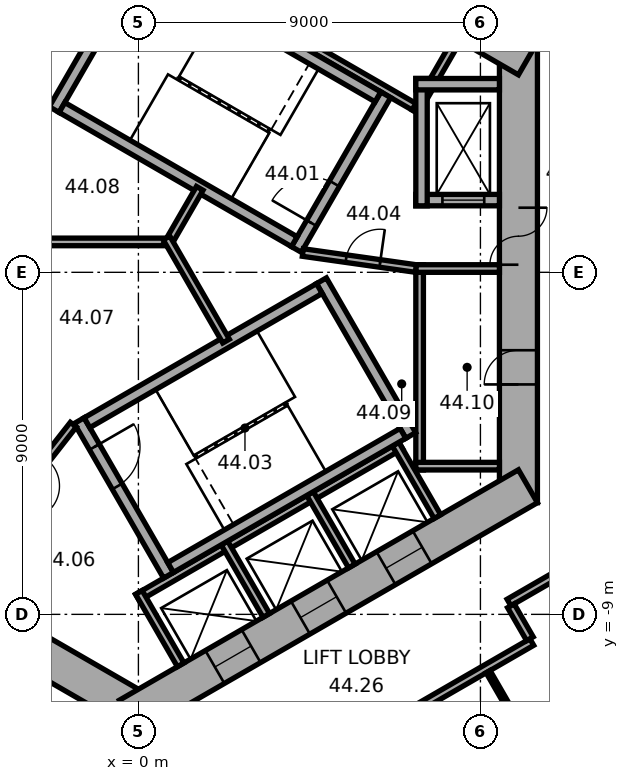
"""IFC4 building model, lengths in metres.
Left out: names, types, materials, properties, quantities, classifications, styles, units other than length and angle.
Written with IfcOpenShell. Run it as: python <this file> out.ifc"""

import sys

from ifc_helpers import new_model, si_unit, direction, frame, frame_2d, origin, place, context, subcontext, project, spatial, rectangle, extrude, element, fill, save


model = new_model("IFC4")
c1 = context("Model", 3, precision=1e-05, world=origin(), true_north=direction((0.0, 1.0)))
c2 = subcontext(c1, "Body", "Model", "MODEL_VIEW")
j1 = project(units=[si_unit("LENGTHUNIT", "METRE"), si_unit("PLANEANGLEUNIT", "RADIAN")], contexts=[c1])
p1 = place(None, origin())
s1 = spatial("IfcSite", under=j1, at=p1, CompositionType="ELEMENT")
p2 = place(p1, origin())
s2 = spatial("IfcBuilding", under=s1, at=p2, CompositionType="ELEMENT")
p3 = place(p2, frame((0.0, 0.0, 179.9)))
s3 = spatial("IfcBuildingStorey", under=s2, at=p3, CompositionType="ELEMENT", Elevation=179.9)
p4 = place(p3, frame((10.0, -6.062, 0.0), z_axis=(0.0, 0.0, 1.0), x_axis=(0.0, 1.0, 0.0)))
e1 = element("IfcWall", 1, at=p4, inside=s3, PredefinedType="SHEAR", context=c2, shape_type="SweptSolid", body=[
    extrude(rectangle(XDim=12.125, YDim=1.0, at=frame_2d((6.062, 0.0))), origin(), (0.0, 0.0, 1.0), 3.7),
])
p5 = place(p4, frame((6.262, 0.0, 0.0)))
e2 = element("IfcOpeningElement", 2, at=p5, cuts=e1, PredefinedType="OPENING", context=c2, shape_type="SweptSolid", body=[
    extrude(rectangle(XDim=1.5, YDim=2.1, at=frame_2d((0.75, 1.05))), frame((0.0, 0.51, 0.0), z_axis=(0.0, -1.0, 0.0), x_axis=(1.0, 0.0, 0.0)), (0.0, 0.0, 1.0), 1.02),
])
p6 = place(p4, frame((3.112, 0.0, 0.0)))
e3 = element("IfcOpeningElement", 3, at=p6, cuts=e1, PredefinedType="OPENING", context=c2, shape_type="SweptSolid", body=[
    extrude(rectangle(XDim=0.9, YDim=2.1, at=frame_2d((0.45, 1.05))), frame((0.0, 0.51, 0.0), z_axis=(0.0, -1.0, 0.0), x_axis=(1.0, 0.0, 0.0)), (0.0, 0.0, 1.0), 1.02),
])
p7 = place(p3, frame((10.25, 5.629, 0.0), z_axis=(0.0, 0.0, 1.0), x_axis=(-0.866022616891, 0.50000482701, 0.0)))
e4 = element("IfcWall", 4, at=p7, inside=s3, PredefinedType="SHEAR", context=c2, shape_type="SweptSolid", body=[
    extrude(rectangle(XDim=12.125, YDim=1.0, at=frame_2d((6.062, 0.0))), origin(), (0.0, 0.0, 1.0), 3.7),
])
p8 = place(p7, frame((5.312, 0.0, 0.0)))
e5 = element("IfcOpeningElement", 5, at=p8, cuts=e4, PredefinedType="OPENING", context=c2, shape_type="SweptSolid", body=[
    extrude(rectangle(XDim=0.9, YDim=2.1, at=frame_2d((0.45, 1.05))), frame((0.0, 0.51, 0.0), z_axis=(0.0, -1.0, 0.0), x_axis=(1.0, 0.0, 0.0)), (0.0, 0.0, 1.0), 1.02),
])
p9 = place(p3, frame((0.25, 11.691, 0.0), z_axis=(0.0, 0.0, 1.0), x_axis=(-0.866022616891, -0.50000482701, 0.0)))
e6 = element("IfcWall", 6, at=p9, inside=s3, PredefinedType="SHEAR", context=c2, shape_type="SweptSolid", body=[
    extrude(rectangle(XDim=12.125, YDim=1.0, at=frame_2d((6.062, 0.0))), origin(), (0.0, 0.0, 1.0), 3.7),
])
p10 = place(p9, frame((6.262, 0.0, 0.0)))
e7 = element("IfcOpeningElement", 7, at=p10, cuts=e6, PredefinedType="OPENING", context=c2, shape_type="SweptSolid", body=[
    extrude(rectangle(XDim=1.5, YDim=2.1, at=frame_2d((0.75, 1.05))), frame((0.0, 0.51, 0.0), z_axis=(0.0, -1.0, 0.0), x_axis=(1.0, 0.0, 0.0)), (0.0, 0.0, 1.0), 1.02),
])
p11 = place(p9, frame((1.812, 0.0, 0.0)))
e8 = element("IfcOpeningElement", 8, at=p11, cuts=e6, PredefinedType="OPENING", context=c2, shape_type="SweptSolid", body=[
    extrude(rectangle(XDim=0.9, YDim=2.1, at=frame_2d((0.45, 1.05))), frame((0.0, 0.51, 0.0), z_axis=(0.0, -1.0, 0.0), x_axis=(1.0, 0.0, 0.0)), (0.0, 0.0, 1.0), 1.02),
])
p12 = place(p9, frame((4.412, 0.0, 0.0)))
e9 = element("IfcOpeningElement", 9, at=p12, cuts=e6, PredefinedType="OPENING", context=c2, shape_type="SweptSolid", body=[
    extrude(rectangle(XDim=0.9, YDim=2.1, at=frame_2d((0.45, 1.05))), frame((0.0, 0.51, 0.0), z_axis=(0.0, -1.0, 0.0), x_axis=(1.0, 0.0, 0.0)), (0.0, 0.0, 1.0), 1.02),
])
p13 = place(p3, frame((-10.25, -5.629, 0.0), z_axis=(0.0, 0.0, 1.0), x_axis=(0.866022616891, -0.50000482701, 0.0)))
e10 = element("IfcWall", 10, at=p13, inside=s3, PredefinedType="SHEAR", context=c2, shape_type="SweptSolid", body=[
    extrude(rectangle(XDim=12.125, YDim=1.0, at=frame_2d((6.062, 0.0))), origin(), (0.0, 0.0, 1.0), 3.7),
])
p14 = place(p13, frame((6.262, 0.0, 0.0)))
e11 = element("IfcOpeningElement", 11, at=p14, cuts=e10, PredefinedType="OPENING", context=c2, shape_type="SweptSolid", body=[
    extrude(rectangle(XDim=1.5, YDim=2.1, at=frame_2d((0.75, 1.05))), frame((0.0, 0.51, 0.0), z_axis=(0.0, -1.0, 0.0), x_axis=(1.0, 0.0, 0.0)), (0.0, 0.0, 1.0), 1.02),
])
p15 = place(p13, frame((1.712, 0.0, 0.0)))
e12 = element("IfcOpeningElement", 12, at=p15, cuts=e10, PredefinedType="OPENING", context=c2, shape_type="SweptSolid", body=[
    extrude(rectangle(XDim=1.1, YDim=2.1, at=frame_2d((0.55, 1.05))), frame((0.0, 0.51, 0.0), z_axis=(0.0, -1.0, 0.0), x_axis=(1.0, 0.0, 0.0)), (0.0, 0.0, 1.0), 1.02),
])
p16 = place(p13, frame((4.312, 0.0, 0.0)))
e13 = element("IfcOpeningElement", 13, at=p16, cuts=e10, PredefinedType="OPENING", context=c2, shape_type="SweptSolid", body=[
    extrude(rectangle(XDim=1.1, YDim=2.1, at=frame_2d((0.55, 1.05))), frame((0.0, 0.51, 0.0), z_axis=(0.0, -1.0, 0.0), x_axis=(1.0, 0.0, 0.0)), (0.0, 0.0, 1.0), 1.02),
])
p17 = place(p3, frame((-0.25, -11.691, 0.0), z_axis=(0.0, 0.0, 1.0), x_axis=(0.866022616891, 0.50000482701, 0.0)))
e14 = element("IfcWall", 14, at=p17, inside=s3, PredefinedType="SHEAR", context=c2, shape_type="SweptSolid", body=[
    extrude(rectangle(XDim=12.125, YDim=1.0, at=frame_2d((6.062, 0.0))), origin(), (0.0, 0.0, 1.0), 3.7),
])
p18 = place(p17, frame((2.612, 0.0, 0.0)))
e15 = element("IfcOpeningElement", 15, at=p18, cuts=e14, PredefinedType="OPENING", context=c2, shape_type="SweptSolid", body=[
    extrude(rectangle(XDim=1.1, YDim=2.1, at=frame_2d((0.55, 1.05))), frame((0.0, 0.51, 0.0), z_axis=(0.0, -1.0, 0.0), x_axis=(1.0, 0.0, 0.0)), (0.0, 0.0, 1.0), 1.02),
])
p19 = place(p17, frame((5.212, 0.0, 0.0)))
e16 = element("IfcOpeningElement", 16, at=p19, cuts=e14, PredefinedType="OPENING", context=c2, shape_type="SweptSolid", body=[
    extrude(rectangle(XDim=1.1, YDim=2.1, at=frame_2d((0.55, 1.05))), frame((0.0, 0.51, 0.0), z_axis=(0.0, -1.0, 0.0), x_axis=(1.0, 0.0, 0.0)), (0.0, 0.0, 1.0), 1.02),
])
p20 = place(p17, frame((7.812, 0.0, 0.0)))
e17 = element("IfcOpeningElement", 17, at=p20, cuts=e14, PredefinedType="OPENING", context=c2, shape_type="SweptSolid", body=[
    extrude(rectangle(XDim=1.1, YDim=2.1, at=frame_2d((0.55, 1.05))), frame((0.0, 0.51, 0.0), z_axis=(0.0, -1.0, 0.0), x_axis=(1.0, 0.0, 0.0)), (0.0, 0.0, 1.0), 1.02),
])
p21 = place(p3, frame((7.4, -5.2, 0.0), z_axis=(0.0, 0.0, 1.0), x_axis=(0.0, 1.0, 0.0)))
e18 = element("IfcWall", 18, at=p21, inside=s3, PredefinedType="PARTITIONING", context=c2, shape_type="SweptSolid", body=[
    extrude(rectangle(XDim=5.4, YDim=0.2, at=frame_2d((2.7, 0.0))), origin(), (0.0, 0.0, 1.0), 3.42),
])
for number, where, z_axis, x_axis in (
    (19, (7.3, -5.1, 0.0), (0.0, 0.0, 1.0), (1.0, 0.0, 0.0)),
    (20, (7.3, 0.1, 0.0), (0.0, 0.0, 1.0), (1.0, 0.0, 0.0)),
):
    element("IfcWall", number, at=place(p3, frame(where, z_axis=z_axis, x_axis=x_axis)), inside=s3, PredefinedType="PARTITIONING", context=c2, shape_type="SweptSolid", body=[
        extrude(rectangle(XDim=2.2, YDim=0.2, at=frame_2d((1.1, 0.0))), origin(), (0.0, 0.0, 1.0), 3.42),
    ])
p22 = place(p3, frame((7.424, 4.259, 0.0), z_axis=(0.0, 0.0, 1.0), x_axis=(-0.866026010844, 0.49999894854, 0.0)))
e21 = element("IfcWall", 21, at=p22, inside=s3, PredefinedType="PARTITIONING", context=c2, shape_type="SweptSolid", body=[
    extrude(rectangle(XDim=8.0, YDim=0.2, at=frame_2d((4.0, 0.0))), origin(), (0.0, 0.0, 1.0), 3.42),
])
p23 = place(p3, frame((7.287, 4.222, 0.0), z_axis=(0.0, 0.0, 1.0), x_axis=(0.499946605688, 0.86605622881, 0.0)))
e22 = element("IfcWall", 22, at=p23, inside=s3, PredefinedType="PARTITIONING", context=c2, shape_type="SweptSolid", body=[
    extrude(rectangle(XDim=2.2, YDim=0.2, at=frame_2d((1.1, 0.0))), origin(), (0.0, 0.0, 1.0), 3.42),
])
p24 = place(p3, frame((-0.024, -8.559, 0.0), z_axis=(0.0, 0.0, 1.0), x_axis=(0.866026010844, 0.49999894854, 0.0)))
e23 = element("IfcWall", 23, at=p24, inside=s3, PredefinedType="PARTITIONING", context=c2, shape_type="SweptSolid", body=[
    extrude(rectangle(XDim=8.0, YDim=0.2, at=frame_2d((4.0, 0.0))), origin(), (0.0, 0.0, 1.0), 3.42),
])
for number, where, z_axis, x_axis in (
    (24, (0.013, -8.422, 0.0), (0.0, 0.0, 1.0), (0.5, -0.866, 0.0)),
    (25, (2.264, -7.122, 0.0), (0.0, 0.0, 1.0), (0.5, -0.866, 0.0)),
    (26, (4.516, -5.822, 0.0), (0.0, 0.0, 1.0), (0.5, -0.866, 0.0)),
    (27, (6.768, -4.522, 0.0), (0.0, 0.0, 1.0), (0.5, -0.866, 0.0)),
):
    element("IfcWall", number, at=place(p3, frame(where, z_axis=z_axis, x_axis=x_axis)), inside=s3, PredefinedType="PARTITIONING", context=c2, shape_type="SweptSolid", body=[
        extrude(rectangle(XDim=2.2, YDim=0.2, at=frame_2d((1.1, 0.0))), origin(), (0.0, 0.0, 1.0), 3.42),
    ])
p25 = place(p3, frame((4.158, 0.602, 0.0), z_axis=(0.0, 0.0, 1.0), x_axis=(0.499977259774, 0.866038532462, 0.0)))
e28 = element("IfcWall", 28, at=p25, inside=s3, PredefinedType="SHEAR", context=c2, shape_type="SweptSolid", body=[
    extrude(rectangle(XDim=4.7, YDim=0.3, at=frame_2d((2.35, 0.0))), origin(), (0.0, 0.0, 1.0), 3.42),
])
p26 = place(p25, frame((0.8, 0.0, 0.0)))
e29 = element("IfcOpeningElement", 29, at=p26, cuts=e28, PredefinedType="OPENING", context=c2, shape_type="SweptSolid", body=[
    extrude(rectangle(XDim=1.2, YDim=2.1, at=frame_2d((0.6, 1.05))), frame((0.0, 0.16, 0.0), z_axis=(0.0, -1.0, 0.0), x_axis=(1.0, 0.0, 0.0)), (0.0, 0.0, 1.0), 0.32),
])
p27 = place(p3, frame((-2.216, 4.282, 0.0), z_axis=(0.0, 0.0, 1.0), x_axis=(0.499977259774, 0.866038532462, 0.0)))
e30 = element("IfcWall", 30, at=p27, inside=s3, PredefinedType="SHEAR", context=c2, shape_type="SweptSolid", body=[
    extrude(rectangle(XDim=4.7, YDim=0.3, at=frame_2d((2.35, 0.0))), origin(), (0.0, 0.0, 1.0), 3.42),
])
for number, where, z_axis, x_axis in (
    (31, (4.103, 0.807, 0.0), (0.0, 0.0, 1.0), (-0.866, 0.5, 0.0)),
    (32, (6.303, 4.617, 0.0), (0.0, 0.0, 1.0), (-0.866, 0.5, 0.0)),
):
    element("IfcWall", number, at=place(p3, frame(where, z_axis=z_axis, x_axis=x_axis)), inside=s3, PredefinedType="SHEAR", context=c2, shape_type="SweptSolid", body=[
        extrude(rectangle(XDim=7.06, YDim=0.3, at=frame_2d((3.53, 0.0))), origin(), (0.0, 0.0, 1.0), 3.42),
    ])
p28 = place(p3, frame((-1.558, -3.902, 0.0), z_axis=(0.0, 0.0, 1.0), x_axis=(0.499977259774, -0.866038532462, 0.0)))
e33 = element("IfcWall", 33, at=p28, inside=s3, PredefinedType="SHEAR", context=c2, shape_type="SweptSolid", body=[
    extrude(rectangle(XDim=4.7, YDim=0.3, at=frame_2d((2.35, 0.0))), origin(), (0.0, 0.0, 1.0), 3.42),
])
p29 = place(p28, frame((0.8, 0.0, 0.0)))
e34 = element("IfcOpeningElement", 34, at=p29, cuts=e33, PredefinedType="OPENING", context=c2, shape_type="SweptSolid", body=[
    extrude(rectangle(XDim=1.2, YDim=2.1, at=frame_2d((0.6, 1.05))), frame((0.0, 0.16, 0.0), z_axis=(0.0, -1.0, 0.0), x_axis=(1.0, 0.0, 0.0)), (0.0, 0.0, 1.0), 0.32),
])
p30 = place(p3, frame((4.816, -0.222, 0.0), z_axis=(0.0, 0.0, 1.0), x_axis=(0.499977259774, -0.866038532462, 0.0)))
e35 = element("IfcWall", 35, at=p30, inside=s3, PredefinedType="SHEAR", context=c2, shape_type="SweptSolid", body=[
    extrude(rectangle(XDim=4.7, YDim=0.3, at=frame_2d((2.35, 0.0))), origin(), (0.0, 0.0, 1.0), 3.42),
])
for number, where, z_axis, x_axis in (
    (36, (-1.353, -3.957, 0.0), (0.0, 0.0, 1.0), (0.866, 0.5, 0.0)),
    (37, (0.847, -7.767, 0.0), (0.0, 0.0, 1.0), (0.866, 0.5, 0.0)),
):
    element("IfcWall", number, at=place(p3, frame(where, z_axis=z_axis, x_axis=x_axis)), inside=s3, PredefinedType="SHEAR", context=c2, shape_type="SweptSolid", body=[
        extrude(rectangle(XDim=7.06, YDim=0.3, at=frame_2d((3.53, 0.0))), origin(), (0.0, 0.0, 1.0), 3.42),
    ])
p31 = place(p3, frame((7.3, 1.9, 0.0), z_axis=(0.0, 0.0, 1.0), x_axis=(1.0, 0.0, 0.0)))
e38 = element("IfcWall", 38, at=p31, inside=s3, PredefinedType="SHEAR", context=c2, shape_type="SweptSolid", body=[
    extrude(rectangle(XDim=2.2, YDim=0.3, at=frame_2d((1.1, 0.0))), origin(), (0.0, 0.0, 1.0), 3.42),
])
p32 = place(p31, frame((0.7, 0.0, 0.0)))
e39 = element("IfcOpeningElement", 39, at=p32, cuts=e38, PredefinedType="OPENING", context=c2, shape_type="SweptSolid", body=[
    extrude(rectangle(XDim=1.1, YDim=2.1, at=frame_2d((0.55, 1.05))), frame((0.0, 0.16, 0.0), z_axis=(0.0, -1.0, 0.0), x_axis=(1.0, 0.0, 0.0)), (0.0, 0.0, 1.0), 0.32),
])
p33 = place(p3, frame((7.45, 1.75, 0.0), z_axis=(0.0, 0.0, 1.0), x_axis=(0.0, 1.0, 0.0)))
e40 = element("IfcWall", 40, at=p33, inside=s3, PredefinedType="SHEAR", context=c2, shape_type="SweptSolid", body=[
    extrude(rectangle(XDim=3.35, YDim=0.3, at=frame_2d((1.675, 0.0))), origin(), (0.0, 0.0, 1.0), 3.42),
])
p34 = place(p3, frame((7.3, 4.95, 0.0), z_axis=(0.0, 0.0, 1.0), x_axis=(1.0, 0.0, 0.0)))
e41 = element("IfcWall", 41, at=p34, inside=s3, PredefinedType="SHEAR", context=c2, shape_type="SweptSolid", body=[
    extrude(rectangle(XDim=2.2, YDim=0.3, at=frame_2d((1.1, 0.0))), origin(), (0.0, 0.0, 1.0), 3.42),
])
p35 = place(p3, frame((4.327, 0.521, 0.0), z_axis=(0.0, 0.0, 1.0), x_axis=(0.990124376366, -0.14019172346, 0.0)))
e42 = element("IfcWall", 42, at=p35, inside=s3, PredefinedType="PARTITIONING", context=c2, shape_type="SweptSolid", body=[
    extrude(rectangle(XDim=3.002, YDim=0.2, at=frame_2d((1.501, 0.0))), origin(), (0.0, 0.0, 1.0), 3.42),
])
p36 = place(p35, frame((1.15, 0.0, 0.0)))
e43 = element("IfcOpeningElement", 43, at=p36, cuts=e42, PredefinedType="OPENING", context=c2, shape_type="SweptSolid", body=[
    extrude(rectangle(XDim=0.9, YDim=2.1, at=frame_2d((0.45, 1.05))), frame((0.0, 0.11, 0.0), z_axis=(0.0, -1.0, 0.0), x_axis=(1.0, 0.0, 0.0)), (0.0, 0.0, 1.0), 0.22),
])
p37 = place(p3, frame((-1.712, -4.008, 0.0), z_axis=(0.0, 0.0, 1.0), x_axis=(-0.616549420702, -0.787316208287, 0.0)))
e44 = element("IfcWall", 44, at=p37, inside=s3, PredefinedType="PARTITIONING", context=c2, shape_type="SweptSolid", body=[
    extrude(rectangle(XDim=3.002, YDim=0.2, at=frame_2d((1.501, 0.0))), origin(), (0.0, 0.0, 1.0), 3.42),
])
p38 = place(p37, frame((1.15, 0.0, 0.0)))
e45 = element("IfcOpeningElement", 45, at=p38, cuts=e44, PredefinedType="OPENING", context=c2, shape_type="SweptSolid", body=[
    extrude(rectangle(XDim=0.9, YDim=2.1, at=frame_2d((0.45, 1.05))), frame((0.0, 0.11, 0.0), z_axis=(0.0, -1.0, 0.0), x_axis=(1.0, 0.0, 0.0)), (0.0, 0.0, 1.0), 0.22),
])
p39 = place(p3, frame((0.92, 0.8, 0.0), z_axis=(0.0, 0.0, 1.0), x_axis=(-1.0, 0.0, 0.0)))
e46 = element("IfcWall", 46, at=p39, inside=s3, PredefinedType="PARTITIONING", context=c2, shape_type="SweptSolid", body=[
    extrude(rectangle(XDim=3.64, YDim=0.2, at=frame_2d((1.82, 0.0))), origin(), (0.0, 0.0, 1.0), 3.42),
])
p40 = place(p3, frame((0.74, 0.696, 0.0), z_axis=(0.0, 0.0, 1.0), x_axis=(0.499956301907, 0.86605063142, 0.0)))
e47 = element("IfcWall", 47, at=p40, inside=s3, PredefinedType="PARTITIONING", context=c2, shape_type="SweptSolid", body=[
    extrude(rectangle(XDim=1.747, YDim=0.2, at=frame_2d((0.874, 0.0))), origin(), (0.0, 0.0, 1.0), 3.42),
])
p41 = place(p3, frame((0.74, 0.904, 0.0), z_axis=(0.0, 0.0, 1.0), x_axis=(0.500028278809, -0.866009076391, 0.0)))
e48 = element("IfcWall", 48, at=p41, inside=s3, PredefinedType="PARTITIONING", context=c2, shape_type="SweptSolid", body=[
    extrude(rectangle(XDim=3.133, YDim=0.2, at=frame_2d((1.566, 0.0))), origin(), (0.0, 0.0, 1.0), 3.42),
])
p42 = place(p3, frame((5.342, -12.621, 0.0), z_axis=(0.0, 0.0, 1.0), x_axis=(0.866024665123, 0.500001279396, 0.0)))
e49 = element("IfcWall", 49, at=p42, inside=s3, PredefinedType="PARTITIONING", context=c2, shape_type="SweptSolid", body=[
    extrude(rectangle(XDim=5.786, YDim=0.2, at=frame_2d((2.893, 0.0))), origin(), (0.0, 0.0, 1.0), 3.42),
])
p43 = place(p3, frame((9.202, -10.508, 0.0), z_axis=(0.0, 0.0, 1.0), x_axis=(0.500043961785, -0.866000020948, 0.0)))
e50 = element("IfcWall", 50, at=p43, inside=s3, PredefinedType="PARTITIONING", context=c2, shape_type="SweptSolid", body=[
    extrude(rectangle(XDim=3.9, YDim=0.12, at=frame_2d((1.95, 0.0))), origin(), (0.0, 0.0, 1.0), 3.42),
])
p44 = place(p3, frame((9.752, -8.688, 0.0), z_axis=(0.0, 0.0, 1.0), x_axis=(0.865974105138, 0.500088841337, 0.0)))
e51 = element("IfcWall", 51, at=p44, inside=s3, PredefinedType="PARTITIONING", context=c2, shape_type="SweptSolid", body=[
    extrude(rectangle(XDim=1.961, YDim=0.2, at=frame_2d((0.98, 0.0))), origin(), (0.0, 0.0, 1.0), 3.42),
])
p45 = place(p3, frame((10.302, -9.642, 0.0), z_axis=(0.0, 0.0, 1.0), x_axis=(-0.500074377092, 0.865982457891, 0.0)))
e52 = element("IfcWall", 52, at=p45, inside=s3, PredefinedType="PARTITIONING", context=c2, shape_type="SweptSolid", body=[
    extrude(rectangle(XDim=1.001, YDim=0.2, at=frame_2d((0.5, 0.0))), origin(), (0.0, 0.0, 1.0), 3.42),
])
p46 = place(p5, origin())
e53 = element("IfcDoor", 53, at=p46, inside=s3, OperationType="DOUBLE_DOOR_SINGLE_SWING", PredefinedType="DOOR", context=c2, shape_type="SweptSolid", body=[
    extrude(rectangle(XDim=1.5, YDim=2.1, at=frame_2d((0.75, 1.05))), frame((0.0, 0.025, 0.0), z_axis=(0.0, -1.0, 0.0), x_axis=(1.0, 0.0, 0.0)), (0.0, 0.0, 1.0), 0.05),
])
fill(e2, e53)
p47 = place(p26, origin())
e54 = element("IfcDoor", 54, at=p47, inside=s3, OperationType="SINGLE_SWING_RIGHT", PredefinedType="DOOR", context=c2, shape_type="SweptSolid", body=[
    extrude(rectangle(XDim=1.2, YDim=2.1, at=frame_2d((0.6, 1.05))), frame((0.0, 0.025, 0.0), z_axis=(0.0, -1.0, 0.0), x_axis=(1.0, 0.0, 0.0)), (0.0, 0.0, 1.0), 0.05),
])
fill(e29, e54)
p48 = place(p29, origin())
e55 = element("IfcDoor", 55, at=p48, inside=s3, OperationType="SINGLE_SWING_RIGHT", PredefinedType="DOOR", context=c2, shape_type="SweptSolid", body=[
    extrude(rectangle(XDim=1.2, YDim=2.1, at=frame_2d((0.6, 1.05))), frame((0.0, 0.025, 0.0), z_axis=(0.0, -1.0, 0.0), x_axis=(1.0, 0.0, 0.0)), (0.0, 0.0, 1.0), 0.05),
])
fill(e34, e55)
p49 = place(p36, origin())
e56 = element("IfcDoor", 56, at=p49, inside=s3, OperationType="SINGLE_SWING_LEFT", PredefinedType="DOOR", context=c2, shape_type="SweptSolid", body=[
    extrude(rectangle(XDim=0.9, YDim=2.1, at=frame_2d((0.45, 1.05))), frame((0.0, 0.025, 0.0), z_axis=(0.0, -1.0, 0.0), x_axis=(1.0, 0.0, 0.0)), (0.0, 0.0, 1.0), 0.05),
])
fill(e43, e56)
p50 = place(p6, origin())
e57 = element("IfcDoor", 57, at=p50, inside=s3, OperationType="SINGLE_SWING_LEFT", PredefinedType="DOOR", context=c2, shape_type="SweptSolid", body=[
    extrude(rectangle(XDim=0.9, YDim=2.1, at=frame_2d((0.45, 1.05))), frame((0.0, 0.025, 0.0), z_axis=(0.0, -1.0, 0.0), x_axis=(1.0, 0.0, 0.0)), (0.0, 0.0, 1.0), 0.05),
])
fill(e3, e57)
p51 = place(p32, origin())
e58 = element("IfcDoor", 58, at=p51, inside=s3, OperationType="DOUBLE_DOOR_SLIDING", PredefinedType="DOOR", context=c2, shape_type="SweptSolid", body=[
    extrude(rectangle(XDim=1.1, YDim=2.1, at=frame_2d((0.55, 1.05))), frame((0.0, 0.025, 0.0), z_axis=(0.0, -1.0, 0.0), x_axis=(1.0, 0.0, 0.0)), (0.0, 0.0, 1.0), 0.05),
])
fill(e39, e58)
p52 = place(p18, origin())
e59 = element("IfcDoor", 59, at=p52, inside=s3, OperationType="DOUBLE_DOOR_SLIDING", PredefinedType="DOOR", context=c2, shape_type="SweptSolid", body=[
    extrude(rectangle(XDim=1.1, YDim=2.1, at=frame_2d((0.55, 1.05))), frame((0.0, 0.025, 0.0), z_axis=(0.0, -1.0, 0.0), x_axis=(1.0, 0.0, 0.0)), (0.0, 0.0, 1.0), 0.05),
])
fill(e15, e59)
p53 = place(p19, origin())
e60 = element("IfcDoor", 60, at=p53, inside=s3, OperationType="DOUBLE_DOOR_SLIDING", PredefinedType="DOOR", context=c2, shape_type="SweptSolid", body=[
    extrude(rectangle(XDim=1.1, YDim=2.1, at=frame_2d((0.55, 1.05))), frame((0.0, 0.025, 0.0), z_axis=(0.0, -1.0, 0.0), x_axis=(1.0, 0.0, 0.0)), (0.0, 0.0, 1.0), 0.05),
])
fill(e16, e60)
p54 = place(p20, origin())
e61 = element("IfcDoor", 61, at=p54, inside=s3, OperationType="DOUBLE_DOOR_SLIDING", PredefinedType="DOOR", context=c2, shape_type="SweptSolid", body=[
    extrude(rectangle(XDim=1.1, YDim=2.1, at=frame_2d((0.55, 1.05))), frame((0.0, 0.025, 0.0), z_axis=(0.0, -1.0, 0.0), x_axis=(1.0, 0.0, 0.0)), (0.0, 0.0, 1.0), 0.05),
])
fill(e17, e61)
save(model, sys.argv[1])
